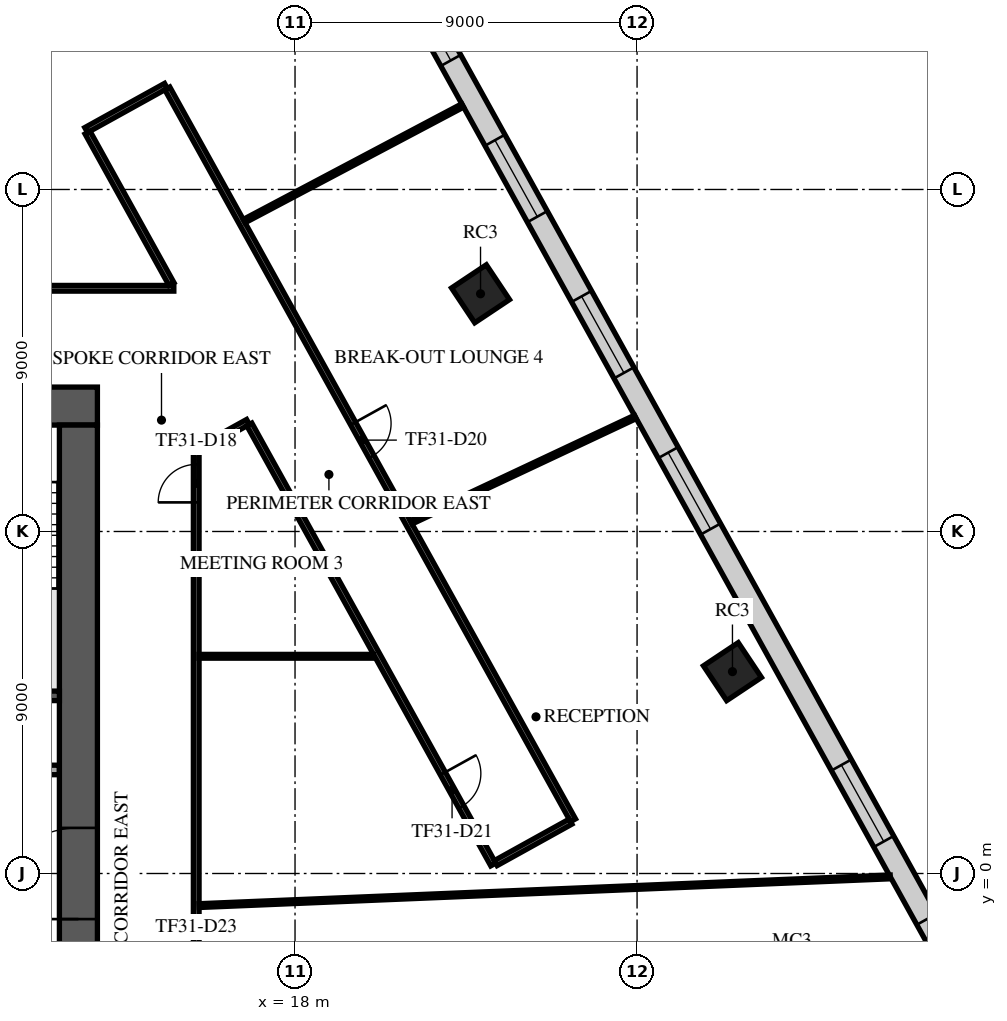
"""IFC4 building model, lengths in metres.
Left out: names, types, materials, properties, quantities, classifications, styles, units other than length and angle.
Written with IfcOpenShell. Run it as: python <this file> out.ifc"""

import sys

from ifc_helpers import new_model, si_unit, direction, frame, frame_2d, origin, origin_2d, place, context, subcontext, project, spatial, rectangle, extrude, element, fill, save


model = new_model("IFC4")
c1 = context("Model", 3, precision=1e-05, world=origin(), true_north=direction((0.0, 1.0)))
c2 = subcontext(c1, "Body", "Model", "MODEL_VIEW")
j1 = project(units=[si_unit("LENGTHUNIT", "METRE"), si_unit("PLANEANGLEUNIT", "RADIAN")], contexts=[c1])
p1 = place(None, origin())
s1 = spatial("IfcSite", under=j1, at=p1, CompositionType="ELEMENT")
p2 = place(p1, origin())
s2 = spatial("IfcBuilding", under=s1, at=p2, CompositionType="ELEMENT")
p3 = place(p2, frame((0.0, 0.0, 135.7)))
s3 = spatial("IfcBuildingStorey", under=s2, at=p3, CompositionType="ELEMENT", Elevation=135.7)
for number, where, z_axis, x_axis in (
    (1, (29.51, 5.312, -0.4), (0.0, 0.0, 1.0), (0.832, 0.555, 0.0)),
    (2, (22.881, 15.255, -0.4), (0.0, 0.0, 1.0), (0.832, 0.555, 0.0)),
):
    element("IfcColumn", number, at=place(p3, frame(where, z_axis=z_axis, x_axis=x_axis)), inside=s3, PredefinedType="COLUMN", context=c2, shape_type="SweptSolid", body=[
        extrude(rectangle(XDim=1.1, YDim=1.1, at=origin_2d()), origin(), (0.0, 0.0, 1.0), 4.4),
    ])
p4 = place(p3, frame((-12.8, 12.3, 0.0), z_axis=(0.0, 0.0, 1.0), x_axis=(1.0, 0.0, 0.0)))
e3 = element("IfcWall", 3, at=p4, inside=s3, PredefinedType="SHEAR", context=c2, shape_type="SweptSolid", body=[
    extrude(rectangle(XDim=25.6, YDim=1.0, at=frame_2d((12.8, 0.0))), origin(), (0.0, 0.0, 1.0), 3.6),
])
p5 = place(p4, frame((11.6, 0.0, 0.0)))
e4 = element("IfcOpeningElement", 4, at=p5, cuts=e3, PredefinedType="OPENING", context=c2, shape_type="SweptSolid", body=[
    extrude(rectangle(XDim=2.4, YDim=2.4, at=frame_2d((1.2, 1.2))), frame((0.0, 0.51, 0.0), z_axis=(0.0, -1.0, 0.0), x_axis=(1.0, 0.0, 0.0)), (0.0, 0.0, 1.0), 1.02),
])
p6 = place(p4, frame((22.425, 0.0, 0.0)))
e5 = element("IfcOpeningElement", 5, at=p6, cuts=e3, PredefinedType="OPENING", context=c2, shape_type="SweptSolid", body=[
    extrude(rectangle(XDim=1.2, YDim=2.1, at=frame_2d((0.6, 1.05))), frame((0.0, 0.51, 0.0), z_axis=(0.0, -1.0, 0.0), x_axis=(1.0, 0.0, 0.0)), (0.0, 0.0, 1.0), 1.02),
])
p7 = place(p4, frame((1.4, 0.0, 0.0)))
e6 = element("IfcOpeningElement", 6, at=p7, cuts=e3, PredefinedType="OPENING", context=c2, shape_type="SweptSolid", body=[
    extrude(rectangle(XDim=1.0, YDim=2.1, at=frame_2d((0.5, 1.05))), frame((0.0, 0.51, 0.0), z_axis=(0.0, -1.0, 0.0), x_axis=(1.0, 0.0, 0.0)), (0.0, 0.0, 1.0), 1.02),
])
p8 = place(p3, frame((12.3, -11.8, 0.0), z_axis=(0.0, 0.0, 1.0), x_axis=(0.0, 1.0, 0.0)))
e7 = element("IfcWall", 7, at=p8, inside=s3, PredefinedType="SHEAR", context=c2, shape_type="SweptSolid", body=[
    extrude(rectangle(XDim=23.6, YDim=1.0, at=frame_2d((11.8, 0.0))), origin(), (0.0, 0.0, 1.0), 3.6),
])
p9 = place(p8, frame((10.6, 0.0, 0.0)))
e8 = element("IfcOpeningElement", 8, at=p9, cuts=e7, PredefinedType="OPENING", context=c2, shape_type="SweptSolid", body=[
    extrude(rectangle(XDim=2.4, YDim=2.4, at=frame_2d((1.2, 1.2))), frame((0.0, 0.51, 0.0), z_axis=(0.0, -1.0, 0.0), x_axis=(1.0, 0.0, 0.0)), (0.0, 0.0, 1.0), 1.02),
])
p10 = place(p3, frame((8.65, 4.675, 0.0), z_axis=(0.0, 0.0, 1.0), x_axis=(1.0, 0.0, 0.0)))
e9 = element("IfcWall", 9, at=p10, inside=s3, PredefinedType="SOLIDWALL", context=c2, shape_type="SweptSolid", body=[
    extrude(rectangle(XDim=3.15, YDim=0.25, at=frame_2d((1.575, 0.0))), origin(), (0.0, 0.0, 1.0), 3.6),
])
p11 = place(p3, frame((8.38, 2.725, 0.0), z_axis=(0.0, 0.0, 1.0), x_axis=(1.0, 0.0, 0.0)))
e10 = element("IfcWall", 10, at=p11, inside=s3, PredefinedType="PARTITIONING", context=c2, shape_type="SweptSolid", body=[
    extrude(rectangle(XDim=3.415, YDim=0.25, at=frame_2d((1.708, 0.0))), origin(), (0.0, 0.0, 1.0), 3.6),
])
p12 = place(p11, frame((1.17, 0.0, 0.0)))
e11 = element("IfcOpeningElement", 11, at=p12, cuts=e10, PredefinedType="OPENING", context=c2, shape_type="SweptSolid", body=[
    extrude(rectangle(XDim=0.9, YDim=2.1, at=frame_2d((0.45, 1.05))), frame((0.0, 0.135, 0.0), z_axis=(0.0, -1.0, 0.0), x_axis=(1.0, 0.0, 0.0)), (0.0, 0.0, 1.0), 0.27),
])
p13 = place(p3, frame((36.291, -4.209, 0.0), z_axis=(0.0, 0.0, 1.0), x_axis=(-0.484811111615, 0.874618880458, 0.0)))
e12 = element("IfcWall", 12, at=p13, inside=s3, PredefinedType="STANDARD", context=c2, shape_type="SweptSolid", body=[
    extrude(rectangle(XDim=42.176, YDim=0.6, at=frame_2d((21.088, 0.0))), origin(), (0.0, 0.0, 1.0), 3.6),
])
p14 = place(p13, frame((1.138, 0.0, 0.9)))
e13 = element("IfcOpeningElement", 13, at=p14, cuts=e12, PredefinedType="OPENING", context=c2, shape_type="SweptSolid", body=[
    extrude(rectangle(XDim=2.3, YDim=2.1, at=frame_2d((1.15, 1.05))), frame((0.0, 0.31, 0.0), z_axis=(0.0, -1.0, 0.0), x_axis=(1.0, 0.0, 0.0)), (0.0, 0.0, 1.0), 0.62),
])
p15 = place(p13, frame((5.776, 0.0, 0.9)))
e14 = element("IfcOpeningElement", 14, at=p15, cuts=e12, PredefinedType="OPENING", context=c2, shape_type="SweptSolid", body=[
    extrude(rectangle(XDim=2.3, YDim=2.1, at=frame_2d((1.15, 1.05))), frame((0.0, 0.31, 0.0), z_axis=(0.0, -1.0, 0.0), x_axis=(1.0, 0.0, 0.0)), (0.0, 0.0, 1.0), 0.62),
])
p16 = place(p13, frame((15.176, 0.0, 0.9)))
e15 = element("IfcOpeningElement", 15, at=p16, cuts=e12, PredefinedType="OPENING", context=c2, shape_type="SweptSolid", body=[
    extrude(rectangle(XDim=2.3, YDim=2.1, at=frame_2d((1.15, 1.05))), frame((0.0, 0.31, 0.0), z_axis=(0.0, -1.0, 0.0), x_axis=(1.0, 0.0, 0.0)), (0.0, 0.0, 1.0), 0.62),
])
p17 = place(p13, frame((19.876, 0.0, 0.9)))
e16 = element("IfcOpeningElement", 16, at=p17, cuts=e12, PredefinedType="OPENING", context=c2, shape_type="SweptSolid", body=[
    extrude(rectangle(XDim=2.3, YDim=2.1, at=frame_2d((1.15, 1.05))), frame((0.0, 0.31, 0.0), z_axis=(0.0, -1.0, 0.0), x_axis=(1.0, 0.0, 0.0)), (0.0, 0.0, 1.0), 0.62),
])
p18 = place(p13, frame((24.576, 0.0, 0.9)))
e17 = element("IfcOpeningElement", 17, at=p18, cuts=e12, PredefinedType="OPENING", context=c2, shape_type="SweptSolid", body=[
    extrude(rectangle(XDim=2.3, YDim=2.1, at=frame_2d((1.15, 1.05))), frame((0.0, 0.31, 0.0), z_axis=(0.0, -1.0, 0.0), x_axis=(1.0, 0.0, 0.0)), (0.0, 0.0, 1.0), 0.62),
])
p19 = place(p13, frame((29.276, 0.0, 0.9)))
e18 = element("IfcOpeningElement", 18, at=p19, cuts=e12, PredefinedType="OPENING", context=c2, shape_type="SweptSolid", body=[
    extrude(rectangle(XDim=2.3, YDim=2.1, at=frame_2d((1.15, 1.05))), frame((0.0, 0.31, 0.0), z_axis=(0.0, -1.0, 0.0), x_axis=(1.0, 0.0, 0.0)), (0.0, 0.0, 1.0), 0.62),
])
p20 = place(p13, frame((33.976, 0.0, 0.9)))
e19 = element("IfcOpeningElement", 19, at=p20, cuts=e12, PredefinedType="OPENING", context=c2, shape_type="SweptSolid", body=[
    extrude(rectangle(XDim=2.3, YDim=2.1, at=frame_2d((1.15, 1.05))), frame((0.0, 0.31, 0.0), z_axis=(0.0, -1.0, 0.0), x_axis=(1.0, 0.0, 0.0)), (0.0, 0.0, 1.0), 0.62),
])
p21 = place(p13, frame((38.676, 0.0, 0.9)))
e20 = element("IfcOpeningElement", 20, at=p21, cuts=e12, PredefinedType="OPENING", context=c2, shape_type="SweptSolid", body=[
    extrude(rectangle(XDim=2.3, YDim=2.1, at=frame_2d((1.15, 1.05))), frame((0.0, 0.31, 0.0), z_axis=(0.0, -1.0, 0.0), x_axis=(1.0, 0.0, 0.0)), (0.0, 0.0, 1.0), 0.62),
])
p22 = place(p3, frame((-3.075, 15.4, 0.0), z_axis=(0.0, 0.0, 1.0), x_axis=(1.0, 0.0, 0.0)))
e21 = element("IfcWall", 21, at=p22, inside=s3, PredefinedType="PARTITIONING", context=c2, shape_type="SweptSolid", body=[
    extrude(rectangle(XDim=17.886, YDim=0.15, at=frame_2d((8.943, 0.0))), origin(), (0.0, 0.0, 1.0), 3.15),
])
p23 = place(p22, frame((10.17, 0.0, 0.0)))
e22 = element("IfcOpeningElement", 22, at=p23, cuts=e21, PredefinedType="OPENING", context=c2, shape_type="SweptSolid", body=[
    extrude(rectangle(XDim=1.8, YDim=2.1, at=frame_2d((0.9, 1.05))), frame((0.0, 0.085, 0.0), z_axis=(0.0, -1.0, 0.0), x_axis=(1.0, 0.0, 0.0)), (0.0, 0.0, 1.0), 0.17),
])
p24 = place(p3, frame((12.504, 19.563, 0.0), z_axis=(0.0, 0.0, 1.0), x_axis=(0.874703778473, 0.484657920522, 0.0)))
e23 = element("IfcWall", 23, at=p24, inside=s3, PredefinedType="PARTITIONING", context=c2, shape_type="SweptSolid", body=[
    extrude(rectangle(XDim=2.4, YDim=0.15, at=frame_2d((1.2, 0.0))), origin(), (0.0, 0.0, 1.0), 3.15),
])
p25 = place(p3, frame((12.54, 19.497, 0.0), z_axis=(0.0, 0.0, 1.0), x_axis=(0.48474201542, -0.874657177691, 0.0)))
e24 = element("IfcWall", 24, at=p25, inside=s3, PredefinedType="PARTITIONING", context=c2, shape_type="SweptSolid", body=[
    extrude(rectangle(XDim=4.557, YDim=0.15, at=frame_2d((2.279, 0.0))), origin(), (0.0, 0.0, 1.0), 3.15),
])
p26 = place(p3, frame((14.639, 20.66, 0.0), z_axis=(0.0, 0.0, 1.0), x_axis=(0.484803020703, -0.874623365294, 0.0)))
e25 = element("IfcWall", 25, at=p26, inside=s3, PredefinedType="PARTITIONING", context=c2, shape_type="SweptSolid", body=[
    extrude(rectangle(XDim=22.02, YDim=0.15, at=frame_2d((11.01, 0.0))), origin(), (0.0, 0.0, 1.0), 3.15),
])
p27 = place(p26, frame((10.083, 0.0, 0.0)))
e26 = element("IfcOpeningElement", 26, at=p27, cuts=e25, PredefinedType="OPENING", context=c2, shape_type="SweptSolid", body=[
    extrude(rectangle(XDim=1.0, YDim=2.1, at=frame_2d((0.5, 1.05))), frame((0.0, 0.085, 0.0), z_axis=(0.0, -1.0, 0.0), x_axis=(1.0, 0.0, 0.0)), (0.0, 0.0, 1.0), 0.17),
])
p28 = place(p3, frame((15.4, -10.568, 0.0), z_axis=(0.0, 0.0, 1.0), x_axis=(0.0, 1.0, 0.0)))
e27 = element("IfcWall", 27, at=p28, inside=s3, PredefinedType="PARTITIONING", context=c2, shape_type="SweptSolid", body=[
    extrude(rectangle(XDim=21.695, YDim=0.15, at=frame_2d((10.847, 0.0))), origin(), (0.0, 0.0, 1.0), 3.15),
])
p29 = place(p28, frame((20.333, 0.0, 0.0)))
e28 = element("IfcOpeningElement", 28, at=p29, cuts=e27, PredefinedType="OPENING", context=c2, shape_type="SweptSolid", body=[
    extrude(rectangle(XDim=1.0, YDim=2.1, at=frame_2d((0.5, 1.05))), frame((0.0, 0.085, 0.0), z_axis=(0.0, -1.0, 0.0), x_axis=(1.0, 0.0, 0.0)), (0.0, 0.0, 1.0), 0.17),
])
p30 = place(p28, frame((7.55, 0.0, 0.0)))
e29 = element("IfcOpeningElement", 29, at=p30, cuts=e27, PredefinedType="OPENING", context=c2, shape_type="SweptSolid", body=[
    extrude(rectangle(XDim=1.0, YDim=2.1, at=frame_2d((0.5, 1.05))), frame((0.0, 0.085, 0.0), z_axis=(0.0, -1.0, 0.0), x_axis=(1.0, 0.0, 0.0)), (0.0, 0.0, 1.0), 0.17),
])
p31 = place(p3, frame((15.511, 11.189, 0.0), z_axis=(0.0, 0.0, 1.0), x_axis=(0.874559677803, 0.484917900227, 0.0)))
e30 = element("IfcWall", 30, at=p31, inside=s3, PredefinedType="PARTITIONING", context=c2, shape_type="SweptSolid", body=[
    extrude(rectangle(XDim=1.43, YDim=0.15, at=frame_2d((0.715, 0.0))), origin(), (0.0, 0.0, 1.0), 3.6),
])
p32 = place(p3, frame((16.798, 11.816, 0.0), z_axis=(0.0, 0.0, 1.0), x_axis=(0.484762728721, -0.874645697893, 0.0)))
e31 = element("IfcWall", 31, at=p32, inside=s3, PredefinedType="PARTITIONING", context=c2, shape_type="SweptSolid", body=[
    extrude(rectangle(XDim=13.239, YDim=0.15, at=frame_2d((6.62, 0.0))), origin(), (0.0, 0.0, 1.0), 3.15),
])
p33 = place(p32, frame((10.503, 0.0, 0.0)))
e32 = element("IfcOpeningElement", 32, at=p33, cuts=e31, PredefinedType="OPENING", context=c2, shape_type="SweptSolid", body=[
    extrude(rectangle(XDim=1.0, YDim=2.1, at=frame_2d((0.5, 1.05))), frame((0.0, 0.085, 0.0), z_axis=(0.0, -1.0, 0.0), x_axis=(1.0, 0.0, 0.0)), (0.0, 0.0, 1.0), 0.17),
])
p34 = place(p3, frame((23.281, 0.273, 0.0), z_axis=(0.0, 0.0, 1.0), x_axis=(0.874586823728, 0.484868938747, 0.0)))
e33 = element("IfcWall", 33, at=p34, inside=s3, PredefinedType="PARTITIONING", context=c2, shape_type="SweptSolid", body=[
    extrude(rectangle(XDim=2.25, YDim=0.15, at=frame_2d((1.125, 0.0))), origin(), (0.0, 0.0, 1.0), 3.15),
])
p35 = place(p3, frame((15.475, 5.716, 0.0), z_axis=(0.0, 0.0, 1.0), x_axis=(1.0, 0.0, 0.0)))
e34 = element("IfcWall", 34, at=p35, inside=s3, PredefinedType="PARTITIONING", context=c2, shape_type="SweptSolid", body=[
    extrude(rectangle(XDim=4.59, YDim=0.1, at=frame_2d((2.295, 0.0))), origin(), (0.0, 0.0, 1.0), 3.03),
])
p36 = place(p3, frame((15.477, -0.845, 0.0), z_axis=(0.0, 0.0, 1.0), x_axis=(0.999139523849, 0.041475437099, 0.0)))
e35 = element("IfcWall", 35, at=p36, inside=s3, PredefinedType="PARTITIONING", context=c2, shape_type="SweptSolid", body=[
    extrude(rectangle(XDim=18.201, YDim=0.1, at=frame_2d((9.1, 0.0))), origin(), (0.0, 0.0, 1.0), 3.6),
])
p37 = place(p3, frame((16.662, 17.168, 0.0), z_axis=(0.0, 0.0, 1.0), x_axis=(0.883911173827, 0.467654826538, 0.0)))
e36 = element("IfcWall", 36, at=p37, inside=s3, PredefinedType="PARTITIONING", context=c2, shape_type="SweptSolid", body=[
    extrude(rectangle(XDim=6.503, YDim=0.1, at=frame_2d((3.251, 0.0))), origin(), (0.0, 0.0, 1.0), 3.15),
])
p38 = place(p3, frame((21.058, 9.242, 0.0), z_axis=(0.0, 0.0, 1.0), x_axis=(0.905003789347, 0.425403504062, 0.0)))
e37 = element("IfcWall", 37, at=p38, inside=s3, PredefinedType="PARTITIONING", context=c2, shape_type="SweptSolid", body=[
    extrude(rectangle(XDim=6.514, YDim=0.1, at=frame_2d((3.257, 0.0))), origin(), (0.0, 0.0, 1.0), 3.15),
])
p39 = place(p9, origin())
e38 = element("IfcDoor", 38, at=p39, inside=s3, OperationType="SINGLE_SWING_LEFT", PredefinedType="DOOR", context=c2, shape_type="SweptSolid", body=[
    extrude(rectangle(XDim=2.4, YDim=2.4, at=frame_2d((1.2, 1.2))), frame((0.0, 0.025, 0.0), z_axis=(0.0, -1.0, 0.0), x_axis=(1.0, 0.0, 0.0)), (0.0, 0.0, 1.0), 0.05),
])
fill(e8, e38)
p40 = place(p14, origin())
e39 = element("IfcWindow", 39, at=p40, inside=s3, PartitioningType="SINGLE_PANEL", PredefinedType="WINDOW", context=c2, shape_type="SweptSolid", body=[
    extrude(rectangle(XDim=2.3, YDim=2.1, at=frame_2d((1.15, 1.05))), frame((0.0, 0.03, 0.0), z_axis=(0.0, -1.0, 0.0), x_axis=(1.0, 0.0, 0.0)), (0.0, 0.0, 1.0), 0.06),
])
fill(e13, e39)
p41 = place(p15, origin())
e40 = element("IfcWindow", 40, at=p41, inside=s3, PartitioningType="SINGLE_PANEL", PredefinedType="WINDOW", context=c2, shape_type="SweptSolid", body=[
    extrude(rectangle(XDim=2.3, YDim=2.1, at=frame_2d((1.15, 1.05))), frame((0.0, 0.03, 0.0), z_axis=(0.0, -1.0, 0.0), x_axis=(1.0, 0.0, 0.0)), (0.0, 0.0, 1.0), 0.06),
])
fill(e14, e40)
p42 = place(p16, origin())
e41 = element("IfcWindow", 41, at=p42, inside=s3, PartitioningType="SINGLE_PANEL", PredefinedType="WINDOW", context=c2, shape_type="SweptSolid", body=[
    extrude(rectangle(XDim=2.3, YDim=2.1, at=frame_2d((1.15, 1.05))), frame((0.0, 0.03, 0.0), z_axis=(0.0, -1.0, 0.0), x_axis=(1.0, 0.0, 0.0)), (0.0, 0.0, 1.0), 0.06),
])
fill(e15, e41)
p43 = place(p17, origin())
e42 = element("IfcWindow", 42, at=p43, inside=s3, PartitioningType="SINGLE_PANEL", PredefinedType="WINDOW", context=c2, shape_type="SweptSolid", body=[
    extrude(rectangle(XDim=2.3, YDim=2.1, at=frame_2d((1.15, 1.05))), frame((0.0, 0.03, 0.0), z_axis=(0.0, -1.0, 0.0), x_axis=(1.0, 0.0, 0.0)), (0.0, 0.0, 1.0), 0.06),
])
fill(e16, e42)
p44 = place(p18, origin())
e43 = element("IfcWindow", 43, at=p44, inside=s3, PartitioningType="SINGLE_PANEL", PredefinedType="WINDOW", context=c2, shape_type="SweptSolid", body=[
    extrude(rectangle(XDim=2.3, YDim=2.1, at=frame_2d((1.15, 1.05))), frame((0.0, 0.03, 0.0), z_axis=(0.0, -1.0, 0.0), x_axis=(1.0, 0.0, 0.0)), (0.0, 0.0, 1.0), 0.06),
])
fill(e17, e43)
p45 = place(p19, origin())
e44 = element("IfcWindow", 44, at=p45, inside=s3, PartitioningType="SINGLE_PANEL", PredefinedType="WINDOW", context=c2, shape_type="SweptSolid", body=[
    extrude(rectangle(XDim=2.3, YDim=2.1, at=frame_2d((1.15, 1.05))), frame((0.0, 0.03, 0.0), z_axis=(0.0, -1.0, 0.0), x_axis=(1.0, 0.0, 0.0)), (0.0, 0.0, 1.0), 0.06),
])
fill(e18, e44)
p46 = place(p29, frame((1.0, 0.0, 0.0), z_axis=(0.0, 0.0, 1.0), x_axis=(-1.0, 0.0, 0.0)))
e45 = element("IfcDoor", 45, at=p46, inside=s3, OperationType="SINGLE_SWING_LEFT", PredefinedType="DOOR", context=c2, shape_type="SweptSolid", body=[
    extrude(rectangle(XDim=1.0, YDim=2.1, at=frame_2d((0.5, 1.05))), frame((0.0, 0.025, 0.0), z_axis=(0.0, -1.0, 0.0), x_axis=(1.0, 0.0, 0.0)), (0.0, 0.0, 1.0), 0.05),
])
fill(e28, e45)
p47 = place(p27, origin())
e46 = element("IfcDoor", 46, at=p47, inside=s3, OperationType="SINGLE_SWING_RIGHT", PredefinedType="DOOR", context=c2, shape_type="SweptSolid", body=[
    extrude(rectangle(XDim=1.0, YDim=2.1, at=frame_2d((0.5, 1.05))), frame((0.0, 0.025, 0.0), z_axis=(0.0, -1.0, 0.0), x_axis=(1.0, 0.0, 0.0)), (0.0, 0.0, 1.0), 0.05),
])
fill(e26, e46)
p48 = place(p33, frame((1.0, 0.0, 0.0), z_axis=(0.0, 0.0, 1.0), x_axis=(-1.0, 0.0, 0.0)))
e47 = element("IfcDoor", 47, at=p48, inside=s3, OperationType="SINGLE_SWING_RIGHT", PredefinedType="DOOR", context=c2, shape_type="SweptSolid", body=[
    extrude(rectangle(XDim=1.0, YDim=2.1, at=frame_2d((0.5, 1.05))), frame((0.0, 0.025, 0.0), z_axis=(0.0, -1.0, 0.0), x_axis=(1.0, 0.0, 0.0)), (0.0, 0.0, 1.0), 0.05),
])
fill(e32, e47)
save(model, sys.argv[1])
